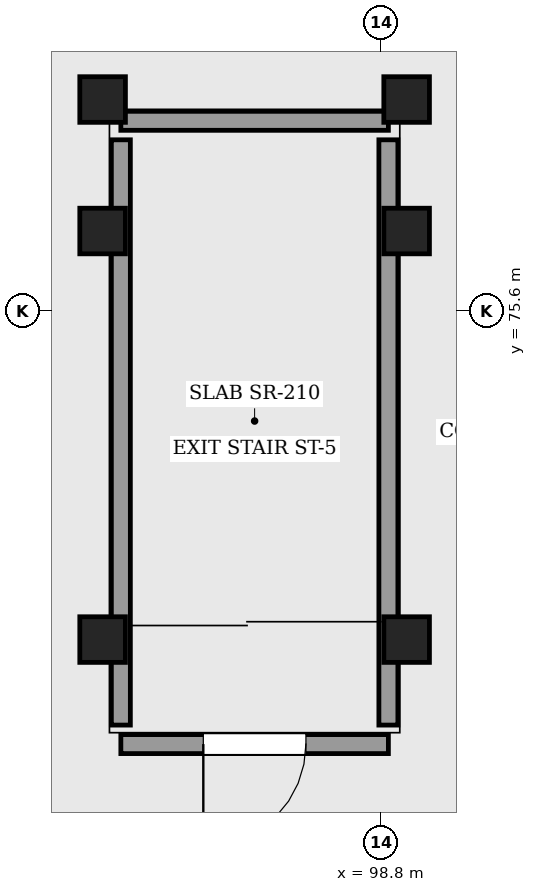
"""IFC4 building model, lengths in metres.
Left out: names, types, materials, properties, quantities, classifications, styles, units other than length and angle.
Written with IfcOpenShell. Run it as: python <this file> out.ifc"""

import sys

from ifc_helpers import new_model, si_unit, direction, frame, frame_2d, origin, origin_2d, place, context, subcontext, project, spatial, rectangle, extrude, element, fill, save


model = new_model("IFC4")
c1 = context("Model", 3, precision=1e-05, world=origin(), true_north=direction((0.0, 1.0)))
c2 = subcontext(c1, "Body", "Model", "MODEL_VIEW")
j1 = project(units=[si_unit("LENGTHUNIT", "METRE"), si_unit("PLANEANGLEUNIT", "RADIAN")], contexts=[c1])
p1 = place(None, origin())
s1 = spatial("IfcSite", under=j1, at=p1, CompositionType="ELEMENT")
p2 = place(p1, origin())
s2 = spatial("IfcBuilding", under=s1, at=p2, CompositionType="ELEMENT")
p3 = place(p2, frame((0.0, 0.0, 25.35)))
s3 = spatial("IfcBuildingStorey", under=s2, at=p3, CompositionType="ELEMENT", Elevation=25.35)
for number, where, z_axis, x_axis in (
    (1, (99.14, 71.275, 0.0), (0.0, 0.0, 1.0), (1.0, 0.0, 0.0)),
    (2, (95.14, 71.275, 0.0), (0.0, 0.0, 1.0), (1.0, 0.0, 0.0)),
    (3, (99.14, 76.65, 0.0), (0.0, 0.0, 1.0), (1.0, 0.0, 0.0)),
    (4, (95.14, 76.65, 0.0), (0.0, 0.0, 1.0), (1.0, 0.0, 0.0)),
    (5, (99.14, 78.38, 0.0), (0.0, 0.0, 1.0), (1.0, 0.0, 0.0)),
    (6, (95.14, 78.38, 0.0), (0.0, 0.0, 1.0), (1.0, 0.0, 0.0)),
):
    element("IfcColumn", number, at=place(p3, frame(where, z_axis=z_axis, x_axis=x_axis)), inside=s3, PredefinedType="COLUMN", context=c2, shape_type="SweptSolid", body=[
        extrude(rectangle(XDim=0.6, YDim=0.6, at=origin_2d()), origin(), (0.0, 0.0, 1.0), 3.1),
    ])
p4 = place(p3, frame((98.9, 69.9, 0.0), z_axis=(0.0, 0.0, 1.0), x_axis=(-1.0, 0.0, 0.0)))
e7 = element("IfcWall", 7, at=p4, inside=s3, PredefinedType="SHEAR", context=c2, shape_type="SweptSolid", body=[
    extrude(rectangle(XDim=3.52, YDim=0.25, at=frame_2d((1.76, 0.0))), origin(), (0.0, 0.0, 1.0), 3.1),
])
p5 = place(p4, frame((1.085, 0.0, 0.0)))
e8 = element("IfcOpeningElement", 8, at=p5, cuts=e7, PredefinedType="OPENING", context=c2, shape_type="SweptSolid", body=[
    extrude(rectangle(XDim=1.35, YDim=2.2, at=frame_2d((0.675, 1.1))), frame((0.0, 0.135, 0.0), z_axis=(0.0, -1.0, 0.0), x_axis=(1.0, 0.0, 0.0)), (0.0, 0.0, 1.0), 0.27),
])
p6 = place(p3, frame((95.38, 70.15, 0.0), z_axis=(0.0, 0.0, 1.0), x_axis=(0.0, 1.0, 0.0)))
e9 = element("IfcWall", 9, at=p6, inside=s3, PredefinedType="SHEAR", context=c2, shape_type="SweptSolid", body=[
    extrude(rectangle(XDim=7.7, YDim=0.25, at=frame_2d((3.85, 0.0))), origin(), (0.0, 0.0, 1.0), 3.1),
])
p7 = place(p3, frame((95.38, 78.1, 0.0), z_axis=(0.0, 0.0, 1.0), x_axis=(1.0, 0.0, 0.0)))
e10 = element("IfcWall", 10, at=p7, inside=s3, PredefinedType="SHEAR", context=c2, shape_type="SweptSolid", body=[
    extrude(rectangle(XDim=3.52, YDim=0.25, at=frame_2d((1.76, 0.0))), origin(), (0.0, 0.0, 1.0), 3.1),
])
p8 = place(p3, frame((98.9, 77.85, 0.0), z_axis=(0.0, 0.0, 1.0), x_axis=(0.0, -1.0, 0.0)))
e11 = element("IfcWall", 11, at=p8, inside=s3, PredefinedType="SHEAR", context=c2, shape_type="SweptSolid", body=[
    extrude(rectangle(XDim=7.7, YDim=0.25, at=frame_2d((3.85, 0.0))), origin(), (0.0, 0.0, 1.0), 3.1),
])
p9 = place(p5, origin())
e12 = element("IfcDoor", 12, at=p9, inside=s3, OperationType="SINGLE_SWING_RIGHT", PredefinedType="DOOR", context=c2, shape_type="SweptSolid", body=[
    extrude(rectangle(XDim=1.35, YDim=2.2, at=frame_2d((0.675, 1.1))), frame((0.0, 0.025, 0.0), z_axis=(0.0, -1.0, 0.0), x_axis=(1.0, 0.0, 0.0)), (0.0, 0.0, 1.0), 0.05),
])
fill(e8, e12)
save(model, sys.argv[1])
